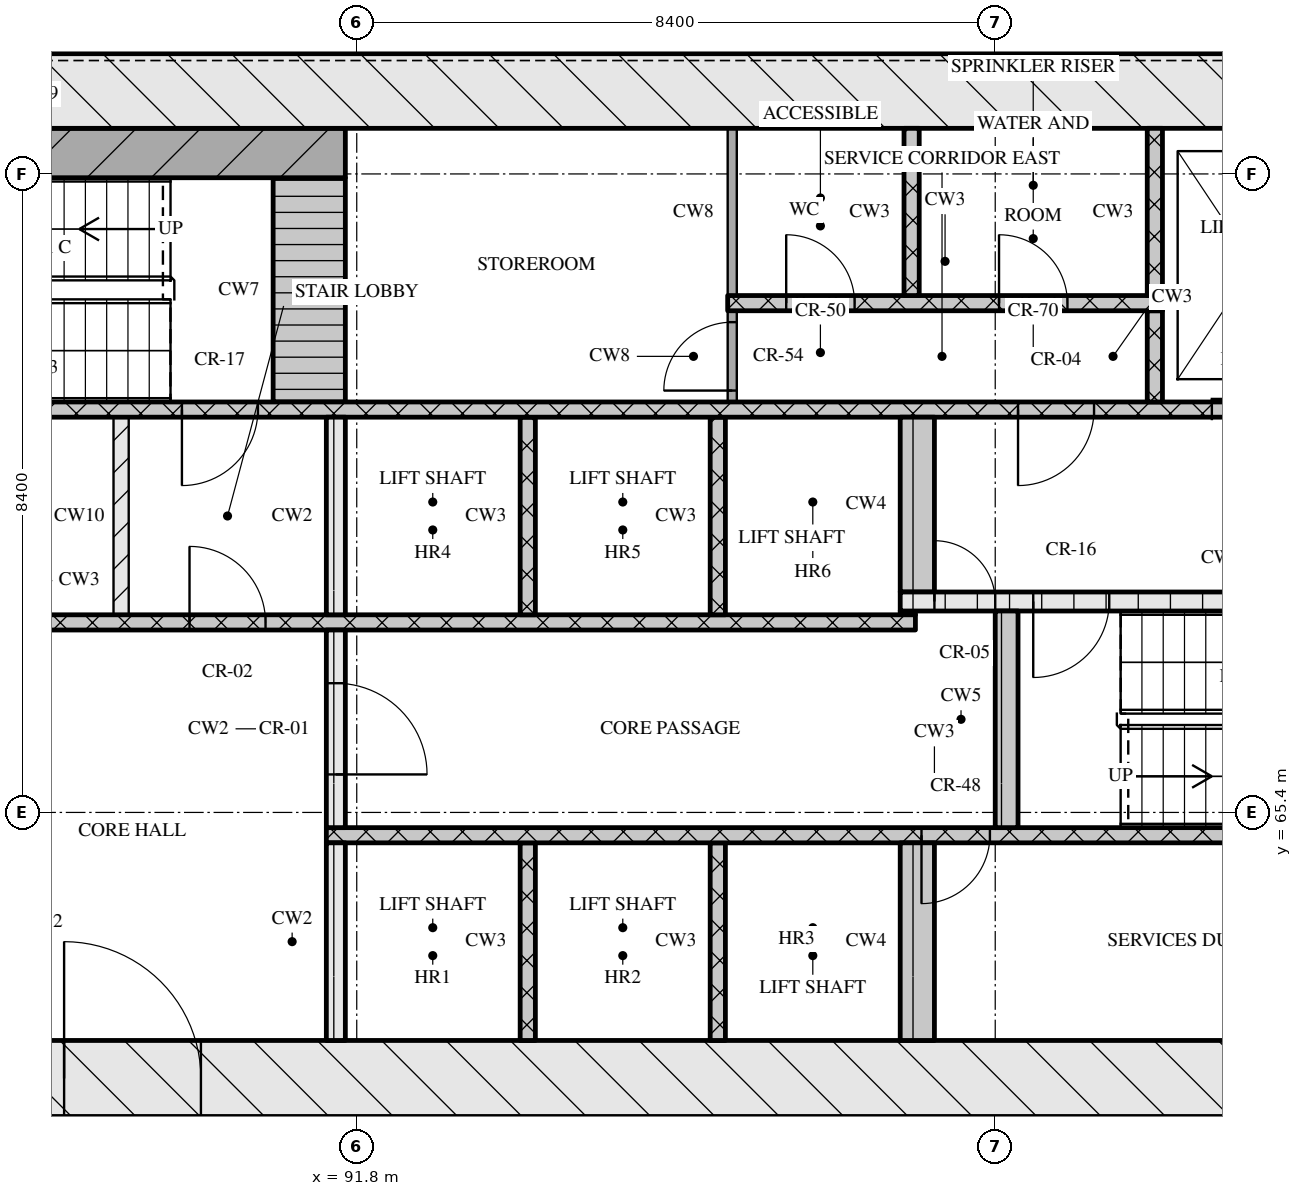
"""IFC4 building model, lengths in metres.
Left out: names, types, materials, properties, quantities, classifications, styles, units other than length and angle.
Written with IfcOpenShell. Run it as: python <this file> out.ifc"""

import sys

from ifc_helpers import new_model, si_unit, direction, frame, frame_2d, origin, place, context, subcontext, project, spatial, rectangle, extrude, element, fill, save


model = new_model("IFC4")
c1 = context("Model", 3, precision=1e-05, world=origin(), true_north=direction((0.0, 1.0)))
c2 = subcontext(c1, "Body", "Model", "MODEL_VIEW")
j1 = project(units=[si_unit("LENGTHUNIT", "METRE"), si_unit("PLANEANGLEUNIT", "RADIAN")], contexts=[c1])
p1 = place(None, origin())
s1 = spatial("IfcSite", under=j1, at=p1, CompositionType="ELEMENT")
p2 = place(p1, origin())
s2 = spatial("IfcBuilding", under=s1, at=p2, CompositionType="ELEMENT")
p3 = place(p2, frame((0.0, 0.0, 138.45)))
s3 = spatial("IfcBuildingStorey", under=s2, at=p3, CompositionType="ELEMENT", Elevation=138.45)
p4 = place(p3, frame((66.8, 61.9, 0.0), z_axis=(0.0, 0.0, 1.0), x_axis=(1.0, 0.0, 0.0)))
e1 = element("IfcWall", 1, at=p4, inside=s3, PredefinedType="SOLIDWALL", context=c2, shape_type="SweptSolid", body=[
    extrude(rectangle(XDim=41.6, YDim=1.0, at=frame_2d((20.8, 0.0))), origin(), (0.0, 0.0, 1.0), 3.3),
])
p5 = place(p4, frame((21.15, 0.0, 0.0)))
e2 = element("IfcOpeningElement", 2, at=p5, cuts=e1, PredefinedType="OPENING", context=c2, shape_type="SweptSolid", body=[
    extrude(rectangle(XDim=1.8, YDim=2.1, at=frame_2d((0.9, 1.05))), frame((0.0, 0.51, 0.0), z_axis=(0.0, -1.0, 0.0), x_axis=(1.0, 0.0, 0.0)), (0.0, 0.0, 1.0), 1.02),
])
p6 = place(p3, frame((66.8, 74.9, 0.0), z_axis=(0.0, 0.0, 1.0), x_axis=(1.0, 0.0, 0.0)))
e3 = element("IfcWall", 3, at=p6, inside=s3, PredefinedType="SOLIDWALL", context=c2, shape_type="SweptSolid", body=[
    extrude(rectangle(XDim=41.6, YDim=1.0, at=frame_2d((20.8, 0.0))), origin(), (0.0, 0.0, 1.0), 3.3),
])
p7 = place(p3, frame((91.525, 62.4, 0.0), z_axis=(0.0, 0.0, 1.0), x_axis=(0.0, 1.0, 0.0)))
e4 = element("IfcWall", 4, at=p7, inside=s3, PredefinedType="SOLIDWALL", context=c2, shape_type="SweptSolid", body=[
    extrude(rectangle(XDim=2.6, YDim=0.25, at=frame_2d((1.3, 0.0))), origin(), (0.0, 0.0, 1.0), 3.3),
])
for number, where, z_axis, x_axis in (
    (5, (94.05, 62.4, 0.0), (0.0, 0.0, 1.0), (0.0, 1.0, 0.0)),
    (6, (96.55, 62.4, 0.0), (0.0, 0.0, 1.0), (0.0, 1.0, 0.0)),
):
    element("IfcWall", number, at=place(p3, frame(where, z_axis=z_axis, x_axis=x_axis)), inside=s3, PredefinedType="SOLIDWALL", context=c2, shape_type="SweptSolid", body=[
        extrude(rectangle(XDim=2.6, YDim=0.2, at=frame_2d((1.3, 0.0))), origin(), (0.0, 0.0, 1.0), 3.3),
    ])
p8 = place(p3, frame((99.175, 62.4, 0.0), z_axis=(0.0, 0.0, 1.0), x_axis=(0.0, 1.0, 0.0)))
e7 = element("IfcWall", 7, at=p8, inside=s3, PredefinedType="SOLIDWALL", context=c2, shape_type="SweptSolid", body=[
    extrude(rectangle(XDim=2.6, YDim=0.45, at=frame_2d((1.3, 0.0))), origin(), (0.0, 0.0, 1.0), 3.3),
])
p9 = place(p3, frame((91.4, 65.1, 0.0), z_axis=(0.0, 0.0, 1.0), x_axis=(1.0, 0.0, 0.0)))
e8 = element("IfcWall", 8, at=p9, inside=s3, PredefinedType="SOLIDWALL", context=c2, shape_type="SweptSolid", body=[
    extrude(rectangle(XDim=16.0, YDim=0.2, at=frame_2d((8.0, 0.0))), origin(), (0.0, 0.0, 1.0), 3.3),
])
p10 = place(p9, frame((7.83, 0.0, 0.0)))
e9 = element("IfcOpeningElement", 9, at=p10, cuts=e8, PredefinedType="OPENING", context=c2, shape_type="SweptSolid", body=[
    extrude(rectangle(XDim=0.9, YDim=2.1, at=frame_2d((0.45, 1.05))), frame((0.0, 0.11, 0.0), z_axis=(0.0, -1.0, 0.0), x_axis=(1.0, 0.0, 0.0)), (0.0, 0.0, 1.0), 0.22),
])
p11 = place(p3, frame((91.525, 65.2, 0.0), z_axis=(0.0, 0.0, 1.0), x_axis=(0.0, 1.0, 0.0)))
e10 = element("IfcWall", 10, at=p11, inside=s3, PredefinedType="SOLIDWALL", context=c2, shape_type="SweptSolid", body=[
    extrude(rectangle(XDim=2.6, YDim=0.25, at=frame_2d((1.3, 0.0))), origin(), (0.0, 0.0, 1.0), 3.3),
])
p12 = place(p11, frame((0.7, 0.0, 0.0)))
e11 = element("IfcOpeningElement", 11, at=p12, cuts=e10, PredefinedType="OPENING", context=c2, shape_type="SweptSolid", body=[
    extrude(rectangle(XDim=1.2, YDim=2.1, at=frame_2d((0.6, 1.05))), frame((0.0, 0.135, 0.0), z_axis=(0.0, -1.0, 0.0), x_axis=(1.0, 0.0, 0.0)), (0.0, 0.0, 1.0), 0.27),
])
p13 = place(p3, frame((100.35, 65.2, 0.0), z_axis=(0.0, 0.0, 1.0), x_axis=(0.0, 1.0, 0.0)))
e12 = element("IfcWall", 12, at=p13, inside=s3, PredefinedType="SOLIDWALL", context=c2, shape_type="SweptSolid", body=[
    extrude(rectangle(XDim=2.85, YDim=0.3, at=frame_2d((1.425, 0.0))), origin(), (0.0, 0.0, 1.0), 3.3),
])
p14 = place(p3, frame((76.05, 67.9, 0.0), z_axis=(0.0, 0.0, 1.0), x_axis=(1.0, 0.0, 0.0)))
e13 = element("IfcWall", 13, at=p14, inside=s3, PredefinedType="SOLIDWALL", context=c2, shape_type="SweptSolid", body=[
    extrude(rectangle(XDim=23.1, YDim=0.2, at=frame_2d((11.55, 0.0))), origin(), (0.0, 0.0, 1.0), 3.3),
])
p15 = place(p14, frame((0.6, 0.0, 0.0)))
e14 = element("IfcOpeningElement", 14, at=p15, cuts=e13, PredefinedType="OPENING", context=c2, shape_type="SweptSolid", body=[
    extrude(rectangle(XDim=1.1, YDim=2.1, at=frame_2d((0.55, 1.05))), frame((0.0, 0.11, 0.0), z_axis=(0.0, -1.0, 0.0), x_axis=(1.0, 0.0, 0.0)), (0.0, 0.0, 1.0), 0.22),
])
p16 = place(p14, frame((3.1, 0.0, 0.0)))
e15 = element("IfcOpeningElement", 15, at=p16, cuts=e13, PredefinedType="OPENING", context=c2, shape_type="SweptSolid", body=[
    extrude(rectangle(XDim=1.1, YDim=2.1, at=frame_2d((0.55, 1.05))), frame((0.0, 0.11, 0.0), z_axis=(0.0, -1.0, 0.0), x_axis=(1.0, 0.0, 0.0)), (0.0, 0.0, 1.0), 0.22),
])
p17 = place(p14, frame((5.6, 0.0, 0.0)))
e16 = element("IfcOpeningElement", 16, at=p17, cuts=e13, PredefinedType="OPENING", context=c2, shape_type="SweptSolid", body=[
    extrude(rectangle(XDim=1.1, YDim=2.1, at=frame_2d((0.55, 1.05))), frame((0.0, 0.11, 0.0), z_axis=(0.0, -1.0, 0.0), x_axis=(1.0, 0.0, 0.0)), (0.0, 0.0, 1.0), 0.22),
])
p18 = place(p14, frame((9.7, 0.0, 0.0)))
e17 = element("IfcOpeningElement", 17, at=p18, cuts=e13, PredefinedType="OPENING", context=c2, shape_type="SweptSolid", body=[
    extrude(rectangle(XDim=0.9, YDim=2.1, at=frame_2d((0.45, 1.05))), frame((0.0, 0.11, 0.0), z_axis=(0.0, -1.0, 0.0), x_axis=(1.0, 0.0, 0.0)), (0.0, 0.0, 1.0), 0.22),
])
p19 = place(p14, frame((13.55, 0.0, 0.0)))
e18 = element("IfcOpeningElement", 18, at=p19, cuts=e13, PredefinedType="OPENING", context=c2, shape_type="SweptSolid", body=[
    extrude(rectangle(XDim=1.0, YDim=2.1, at=frame_2d((0.5, 1.05))), frame((0.0, 0.11, 0.0), z_axis=(0.0, -1.0, 0.0), x_axis=(1.0, 0.0, 0.0)), (0.0, 0.0, 1.0), 0.22),
])
p20 = place(p3, frame((88.7, 68.0, 0.0), z_axis=(0.0, 0.0, 1.0), x_axis=(0.0, 1.0, 0.0)))
e19 = element("IfcWall", 19, at=p20, inside=s3, PredefinedType="PARTITIONING", context=c2, shape_type="SweptSolid", body=[
    extrude(rectangle(XDim=2.6, YDim=0.2, at=frame_2d((1.3, 0.0))), origin(), (0.0, 0.0, 1.0), 3.3),
])
p21 = place(p3, frame((91.525, 68.0, 0.0), z_axis=(0.0, 0.0, 1.0), x_axis=(0.0, 1.0, 0.0)))
e20 = element("IfcWall", 20, at=p21, inside=s3, PredefinedType="SOLIDWALL", context=c2, shape_type="SweptSolid", body=[
    extrude(rectangle(XDim=2.6, YDim=0.25, at=frame_2d((1.3, 0.0))), origin(), (0.0, 0.0, 1.0), 3.3),
])
for number, where, z_axis, x_axis in (
    (21, (94.05, 68.0, 0.0), (0.0, 0.0, 1.0), (0.0, 1.0, 0.0)),
    (22, (96.55, 68.0, 0.0), (0.0, 0.0, 1.0), (0.0, 1.0, 0.0)),
):
    element("IfcWall", number, at=place(p3, frame(where, z_axis=z_axis, x_axis=x_axis)), inside=s3, PredefinedType="SOLIDWALL", context=c2, shape_type="SweptSolid", body=[
        extrude(rectangle(XDim=2.6, YDim=0.2, at=frame_2d((1.3, 0.0))), origin(), (0.0, 0.0, 1.0), 3.3),
    ])
p22 = place(p3, frame((98.95, 68.025, 0.0), z_axis=(0.0, 0.0, 1.0), x_axis=(1.0, 0.0, 0.0)))
e23 = element("IfcWall", 23, at=p22, inside=s3, PredefinedType="SOLIDWALL", context=c2, shape_type="SweptSolid", body=[
    extrude(rectangle(XDim=0.2, YDim=0.05, at=frame_2d((0.1, 0.0))), origin(), (0.0, 0.0, 1.0), 3.3),
])
p23 = place(p3, frame((98.95, 68.175, 0.0), z_axis=(0.0, 0.0, 1.0), x_axis=(1.0, 0.0, 0.0)))
e24 = element("IfcWall", 24, at=p23, inside=s3, PredefinedType="SOLIDWALL", context=c2, shape_type="SweptSolid", body=[
    extrude(rectangle(XDim=8.45, YDim=0.25, at=frame_2d((4.225, 0.0))), origin(), (0.0, 0.0, 1.0), 3.3),
])
p24 = place(p23, frame((0.45, 0.0, 0.0)))
e25 = element("IfcOpeningElement", 25, at=p24, cuts=e24, PredefinedType="OPENING", context=c2, shape_type="SweptSolid", body=[
    extrude(rectangle(XDim=0.8, YDim=2.1, at=frame_2d((0.4, 1.05))), frame((0.0, 0.135, 0.0), z_axis=(0.0, -1.0, 0.0), x_axis=(1.0, 0.0, 0.0)), (0.0, 0.0, 1.0), 0.27),
])
p25 = place(p23, frame((1.75, 0.0, 0.0)))
e26 = element("IfcOpeningElement", 26, at=p25, cuts=e24, PredefinedType="OPENING", context=c2, shape_type="SweptSolid", body=[
    extrude(rectangle(XDim=1.0, YDim=2.1, at=frame_2d((0.5, 1.05))), frame((0.0, 0.135, 0.0), z_axis=(0.0, -1.0, 0.0), x_axis=(1.0, 0.0, 0.0)), (0.0, 0.0, 1.0), 0.27),
])
p26 = place(p3, frame((99.175, 68.3, 0.0), z_axis=(0.0, 0.0, 1.0), x_axis=(0.0, 1.0, 0.0)))
e27 = element("IfcWall", 27, at=p26, inside=s3, PredefinedType="SOLIDWALL", context=c2, shape_type="SweptSolid", body=[
    extrude(rectangle(XDim=2.3, YDim=0.45, at=frame_2d((1.15, 0.0))), origin(), (0.0, 0.0, 1.0), 3.3),
])
p27 = place(p3, frame((67.8, 70.7, 0.0), z_axis=(0.0, 0.0, 1.0), x_axis=(1.0, 0.0, 0.0)))
e28 = element("IfcWall", 28, at=p27, inside=s3, PredefinedType="SOLIDWALL", context=c2, shape_type="SweptSolid", body=[
    extrude(rectangle(XDim=39.6, YDim=0.2, at=frame_2d((19.8, 0.0))), origin(), (0.0, 0.0, 1.0), 3.3),
])
p28 = place(p27, frame((0.65, 0.0, 0.0)))
e29 = element("IfcOpeningElement", 29, at=p28, cuts=e28, PredefinedType="OPENING", context=c2, shape_type="SweptSolid", body=[
    extrude(rectangle(XDim=1.1, YDim=2.1, at=frame_2d((0.55, 1.05))), frame((0.0, 0.11, 0.0), z_axis=(0.0, -1.0, 0.0), x_axis=(1.0, 0.0, 0.0)), (0.0, 0.0, 1.0), 0.22),
])
p29 = place(p27, frame((3.25, 0.0, 0.0)))
e30 = element("IfcOpeningElement", 30, at=p29, cuts=e28, PredefinedType="OPENING", context=c2, shape_type="SweptSolid", body=[
    extrude(rectangle(XDim=1.1, YDim=2.1, at=frame_2d((0.55, 1.05))), frame((0.0, 0.11, 0.0), z_axis=(0.0, -1.0, 0.0), x_axis=(1.0, 0.0, 0.0)), (0.0, 0.0, 1.0), 0.22),
])
p30 = place(p27, frame((5.9, 0.0, 0.0)))
e31 = element("IfcOpeningElement", 31, at=p30, cuts=e28, PredefinedType="OPENING", context=c2, shape_type="SweptSolid", body=[
    extrude(rectangle(XDim=1.0, YDim=2.1, at=frame_2d((0.5, 1.05))), frame((0.0, 0.11, 0.0), z_axis=(0.0, -1.0, 0.0), x_axis=(1.0, 0.0, 0.0)), (0.0, 0.0, 1.0), 0.22),
])
p31 = place(p27, frame((21.7, 0.0, 0.0)))
e32 = element("IfcOpeningElement", 32, at=p31, cuts=e28, PredefinedType="OPENING", context=c2, shape_type="SweptSolid", body=[
    extrude(rectangle(XDim=1.0, YDim=2.1, at=frame_2d((0.5, 1.05))), frame((0.0, 0.11, 0.0), z_axis=(0.0, -1.0, 0.0), x_axis=(1.0, 0.0, 0.0)), (0.0, 0.0, 1.0), 0.22),
])
p32 = place(p27, frame((32.7, 0.0, 0.0)))
e33 = element("IfcOpeningElement", 33, at=p32, cuts=e28, PredefinedType="OPENING", context=c2, shape_type="SweptSolid", body=[
    extrude(rectangle(XDim=1.0, YDim=2.1, at=frame_2d((0.5, 1.05))), frame((0.0, 0.11, 0.0), z_axis=(0.0, -1.0, 0.0), x_axis=(1.0, 0.0, 0.0)), (0.0, 0.0, 1.0), 0.22),
])
p33 = place(p27, frame((35.25, 0.0, 0.0)))
e34 = element("IfcOpeningElement", 34, at=p33, cuts=e28, PredefinedType="OPENING", context=c2, shape_type="SweptSolid", body=[
    extrude(rectangle(XDim=1.1, YDim=2.1, at=frame_2d((0.55, 1.05))), frame((0.0, 0.11, 0.0), z_axis=(0.0, -1.0, 0.0), x_axis=(1.0, 0.0, 0.0)), (0.0, 0.0, 1.0), 0.22),
])
p34 = place(p27, frame((37.85, 0.0, 0.0)))
e35 = element("IfcOpeningElement", 35, at=p34, cuts=e28, PredefinedType="OPENING", context=c2, shape_type="SweptSolid", body=[
    extrude(rectangle(XDim=1.1, YDim=2.1, at=frame_2d((0.55, 1.05))), frame((0.0, 0.11, 0.0), z_axis=(0.0, -1.0, 0.0), x_axis=(1.0, 0.0, 0.0)), (0.0, 0.0, 1.0), 0.22),
])
p35 = place(p3, frame((91.175, 70.8, 0.0), z_axis=(0.0, 0.0, 1.0), x_axis=(0.0, 1.0, 0.0)))
e36 = element("IfcWall", 36, at=p35, inside=s3, PredefinedType="SOLIDWALL", context=c2, shape_type="SweptSolid", body=[
    extrude(rectangle(XDim=2.95, YDim=0.95, at=frame_2d((1.475, 0.0))), origin(), (0.0, 0.0, 1.0), 3.3),
])
p36 = place(p3, frame((96.74, 70.8, 0.0), z_axis=(0.0, 0.0, 1.0), x_axis=(0.0, 1.0, 0.0)))
e37 = element("IfcWall", 37, at=p36, inside=s3, PredefinedType="PARTITIONING", context=c2, shape_type="SweptSolid", body=[
    extrude(rectangle(XDim=1.2, YDim=0.12, at=frame_2d((0.6, 0.0))), origin(), (0.0, 0.0, 1.0), 3.3),
])
p37 = place(p36, frame((0.15, 0.0, 0.0)))
e38 = element("IfcOpeningElement", 38, at=p37, cuts=e37, PredefinedType="OPENING", context=c2, shape_type="SweptSolid", body=[
    extrude(rectangle(XDim=0.9, YDim=2.1, at=frame_2d((0.45, 1.05))), frame((0.0, 0.07, 0.0), z_axis=(0.0, -1.0, 0.0), x_axis=(1.0, 0.0, 0.0)), (0.0, 0.0, 1.0), 0.14),
])
p38 = place(p3, frame((102.3, 70.8, 0.0), z_axis=(0.0, 0.0, 1.0), x_axis=(0.0, 1.0, 0.0)))
e39 = element("IfcWall", 39, at=p38, inside=s3, PredefinedType="SOLIDWALL", context=c2, shape_type="SweptSolid", body=[
    extrude(rectangle(XDim=1.2, YDim=0.2, at=frame_2d((0.6, 0.0))), origin(), (0.0, 0.0, 1.0), 3.3),
])
p39 = place(p3, frame((96.68, 72.1, 0.0), z_axis=(0.0, 0.0, 1.0), x_axis=(1.0, 0.0, 0.0)))
e40 = element("IfcWall", 40, at=p39, inside=s3, PredefinedType="SOLIDWALL", context=c2, shape_type="SweptSolid", body=[
    extrude(rectangle(XDim=5.72, YDim=0.2, at=frame_2d((2.86, 0.0))), origin(), (0.0, 0.0, 1.0), 3.3),
])
p40 = place(p39, frame((0.77, 0.0, 0.0)))
e41 = element("IfcOpeningElement", 41, at=p40, cuts=e40, PredefinedType="OPENING", context=c2, shape_type="SweptSolid", body=[
    extrude(rectangle(XDim=0.9, YDim=2.1, at=frame_2d((0.45, 1.05))), frame((0.0, 0.11, 0.0), z_axis=(0.0, -1.0, 0.0), x_axis=(1.0, 0.0, 0.0)), (0.0, 0.0, 1.0), 0.22),
])
p41 = place(p39, frame((3.57, 0.0, 0.0)))
e42 = element("IfcOpeningElement", 42, at=p41, cuts=e40, PredefinedType="OPENING", context=c2, shape_type="SweptSolid", body=[
    extrude(rectangle(XDim=0.9, YDim=2.1, at=frame_2d((0.45, 1.05))), frame((0.0, 0.11, 0.0), z_axis=(0.0, -1.0, 0.0), x_axis=(1.0, 0.0, 0.0)), (0.0, 0.0, 1.0), 0.22),
])
p42 = place(p3, frame((96.74, 72.2, 0.0), z_axis=(0.0, 0.0, 1.0), x_axis=(0.0, 1.0, 0.0)))
e43 = element("IfcWall", 43, at=p42, inside=s3, PredefinedType="PARTITIONING", context=c2, shape_type="SweptSolid", body=[
    extrude(rectangle(XDim=2.2, YDim=0.12, at=frame_2d((1.1, 0.0))), origin(), (0.0, 0.0, 1.0), 3.3),
])
for number, where, z_axis, x_axis in (
    (44, (99.1, 72.2, 0.0), (0.0, 0.0, 1.0), (0.0, 1.0, 0.0)),
    (45, (102.3, 72.2, 0.0), (0.0, 0.0, 1.0), (0.0, 1.0, 0.0)),
):
    element("IfcWall", number, at=place(p3, frame(where, z_axis=z_axis, x_axis=x_axis)), inside=s3, PredefinedType="SOLIDWALL", context=c2, shape_type="SweptSolid", body=[
        extrude(rectangle(XDim=2.2, YDim=0.2, at=frame_2d((1.1, 0.0))), origin(), (0.0, 0.0, 1.0), 3.3),
    ])
p43 = place(p3, frame((83.55, 74.075, 0.0), z_axis=(0.0, 0.0, 1.0), x_axis=(1.0, 0.0, 0.0)))
e46 = element("IfcWall", 46, at=p43, inside=s3, PredefinedType="SOLIDWALL", context=c2, shape_type="SweptSolid", body=[
    extrude(rectangle(XDim=8.1, YDim=0.65, at=frame_2d((4.05, 0.0))), origin(), (0.0, 0.0, 1.0), 3.3),
])
p44 = place(p5, origin())
e47 = element("IfcDoor", 47, at=p44, inside=s3, OperationType="DOUBLE_DOOR_SINGLE_SWING", PredefinedType="DOOR", context=c2, shape_type="SweptSolid", body=[
    extrude(rectangle(XDim=1.8, YDim=2.1, at=frame_2d((0.9, 1.05))), frame((0.0, 0.025, 0.0), z_axis=(0.0, -1.0, 0.0), x_axis=(1.0, 0.0, 0.0)), (0.0, 0.0, 1.0), 0.05),
])
fill(e2, e47)
p45 = place(p10, origin())
e48 = element("IfcDoor", 48, at=p45, inside=s3, OperationType="SINGLE_SWING_RIGHT", PredefinedType="DOOR", context=c2, shape_type="SweptSolid", body=[
    extrude(rectangle(XDim=0.9, YDim=2.1, at=frame_2d((0.45, 1.05))), frame((0.0, 0.025, 0.0), z_axis=(0.0, -1.0, 0.0), x_axis=(1.0, 0.0, 0.0)), (0.0, 0.0, 1.0), 0.05),
])
fill(e9, e48)
p46 = place(p12, origin())
e49 = element("IfcDoor", 49, at=p46, inside=s3, OperationType="SINGLE_SWING_RIGHT", PredefinedType="DOOR", context=c2, shape_type="SweptSolid", body=[
    extrude(rectangle(XDim=1.2, YDim=2.1, at=frame_2d((0.6, 1.05))), frame((0.0, 0.025, 0.0), z_axis=(0.0, -1.0, 0.0), x_axis=(1.0, 0.0, 0.0)), (0.0, 0.0, 1.0), 0.05),
])
fill(e11, e49)
p47 = place(p19, origin())
e50 = element("IfcDoor", 50, at=p47, inside=s3, OperationType="SINGLE_SWING_LEFT", PredefinedType="DOOR", context=c2, shape_type="SweptSolid", body=[
    extrude(rectangle(XDim=1.0, YDim=2.1, at=frame_2d((0.5, 1.05))), frame((0.0, 0.025, 0.0), z_axis=(0.0, -1.0, 0.0), x_axis=(1.0, 0.0, 0.0)), (0.0, 0.0, 1.0), 0.05),
])
fill(e18, e50)
p48 = place(p24, origin())
e51 = element("IfcDoor", 51, at=p48, inside=s3, OperationType="SINGLE_SWING_LEFT", PredefinedType="DOOR", context=c2, shape_type="SweptSolid", body=[
    extrude(rectangle(XDim=0.8, YDim=2.1, at=frame_2d((0.4, 1.05))), frame((0.0, 0.025, 0.0), z_axis=(0.0, -1.0, 0.0), x_axis=(1.0, 0.0, 0.0)), (0.0, 0.0, 1.0), 0.05),
])
fill(e25, e51)
p49 = place(p25, origin())
e52 = element("IfcDoor", 52, at=p49, inside=s3, OperationType="SINGLE_SWING_RIGHT", PredefinedType="DOOR", context=c2, shape_type="SweptSolid", body=[
    extrude(rectangle(XDim=1.0, YDim=2.1, at=frame_2d((0.5, 1.05))), frame((0.0, 0.025, 0.0), z_axis=(0.0, -1.0, 0.0), x_axis=(1.0, 0.0, 0.0)), (0.0, 0.0, 1.0), 0.05),
])
fill(e26, e52)
p50 = place(p31, origin())
e53 = element("IfcDoor", 53, at=p50, inside=s3, OperationType="SINGLE_SWING_RIGHT", PredefinedType="DOOR", context=c2, shape_type="SweptSolid", body=[
    extrude(rectangle(XDim=1.0, YDim=2.1, at=frame_2d((0.5, 1.05))), frame((0.0, 0.025, 0.0), z_axis=(0.0, -1.0, 0.0), x_axis=(1.0, 0.0, 0.0)), (0.0, 0.0, 1.0), 0.05),
])
fill(e32, e53)
p51 = place(p32, origin())
e54 = element("IfcDoor", 54, at=p51, inside=s3, OperationType="SINGLE_SWING_RIGHT", PredefinedType="DOOR", context=c2, shape_type="SweptSolid", body=[
    extrude(rectangle(XDim=1.0, YDim=2.1, at=frame_2d((0.5, 1.05))), frame((0.0, 0.025, 0.0), z_axis=(0.0, -1.0, 0.0), x_axis=(1.0, 0.0, 0.0)), (0.0, 0.0, 1.0), 0.05),
])
fill(e33, e54)
p52 = place(p33, origin())
e55 = element("IfcDoor", 55, at=p52, inside=s3, OperationType="SLIDING_TO_RIGHT", PredefinedType="DOOR", context=c2, shape_type="SweptSolid", body=[
    extrude(rectangle(XDim=1.1, YDim=2.1, at=frame_2d((0.55, 1.05))), frame((0.0, 0.025, 0.0), z_axis=(0.0, -1.0, 0.0), x_axis=(1.0, 0.0, 0.0)), (0.0, 0.0, 1.0), 0.05),
])
fill(e34, e55)
p53 = place(p37, origin())
e56 = element("IfcDoor", 56, at=p53, inside=s3, OperationType="SINGLE_SWING_LEFT", PredefinedType="DOOR", context=c2, shape_type="SweptSolid", body=[
    extrude(rectangle(XDim=0.9, YDim=2.1, at=frame_2d((0.45, 1.05))), frame((0.0, 0.025, 0.0), z_axis=(0.0, -1.0, 0.0), x_axis=(1.0, 0.0, 0.0)), (0.0, 0.0, 1.0), 0.05),
])
fill(e38, e56)
p54 = place(p40, origin())
e57 = element("IfcDoor", 57, at=p54, inside=s3, OperationType="SINGLE_SWING_LEFT", PredefinedType="DOOR", context=c2, shape_type="SweptSolid", body=[
    extrude(rectangle(XDim=0.9, YDim=2.1, at=frame_2d((0.45, 1.05))), frame((0.0, 0.025, 0.0), z_axis=(0.0, -1.0, 0.0), x_axis=(1.0, 0.0, 0.0)), (0.0, 0.0, 1.0), 0.05),
])
fill(e41, e57)
p55 = place(p41, origin())
e58 = element("IfcDoor", 58, at=p55, inside=s3, OperationType="SINGLE_SWING_LEFT", PredefinedType="DOOR", context=c2, shape_type="SweptSolid", body=[
    extrude(rectangle(XDim=0.9, YDim=2.1, at=frame_2d((0.45, 1.05))), frame((0.0, 0.025, 0.0), z_axis=(0.0, -1.0, 0.0), x_axis=(1.0, 0.0, 0.0)), (0.0, 0.0, 1.0), 0.05),
])
fill(e42, e58)
save(model, sys.argv[1])
